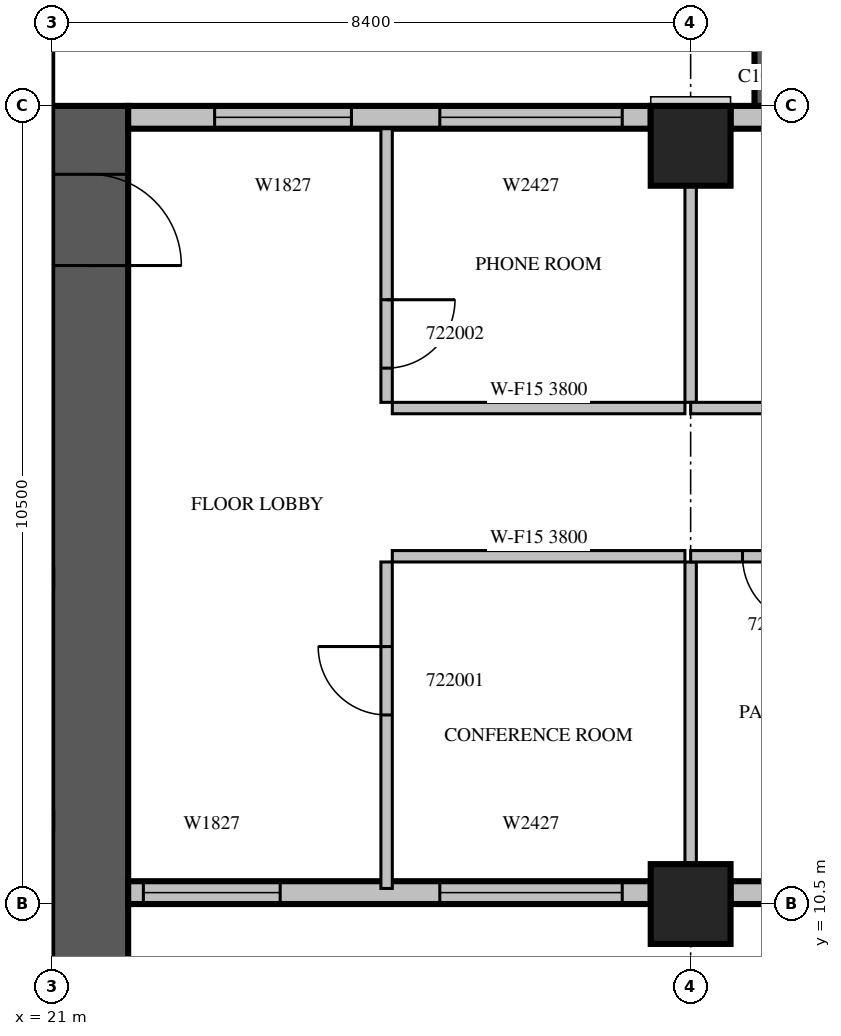
"""IFC4 building model, lengths in metres.
Left out: names, types, materials, properties, quantities, classifications, styles, units other than length and angle.
Written with IfcOpenShell. Run it as: python <this file> out.ifc"""

import sys

from ifc_helpers import new_model, si_unit, direction, frame, frame_2d, origin, origin_2d, place, context, subcontext, project, spatial, rectangle, extrude, source, transform, mapped, element, fill, save


model = new_model("IFC4")
c1 = context("Model", 3, precision=1e-05, world=origin(), true_north=direction((0.0, 1.0)))
c2 = subcontext(c1, "Body", "Model", "MODEL_VIEW")
j1 = project(units=[si_unit("LENGTHUNIT", "METRE"), si_unit("PLANEANGLEUNIT", "RADIAN")], contexts=[c1])
p1 = place(None, origin())
s1 = spatial("IfcSite", under=j1, at=p1, CompositionType="ELEMENT")
p2 = place(p1, origin())
s2 = spatial("IfcBuilding", under=s1, at=p2, CompositionType="ELEMENT")
p3 = place(p2, frame((0.0, 0.0, 103.5)))
s3 = spatial("IfcBuildingStorey", under=s2, at=p3, CompositionType="ELEMENT", Elevation=103.5)
m1 = source(origin(), c2, "Body", "SweptSolid", [
    extrude(rectangle(XDim=1.05, YDim=1.05, at=origin_2d()), origin(), (0.0, 0.0, 1.0), 4.2),
])
for number, where, z_axis, x_axis in (
    (1, (29.4, 10.5, 0.0), (0.0, 0.0, 1.0), (1.0, 0.0, 0.0)),
    (2, (29.4, 20.475, 0.0), (0.0, 0.0, 1.0), (1.0, 0.0, 0.0)),
):
    element("IfcColumn", number, at=place(p3, frame(where, z_axis=z_axis, x_axis=x_axis)), inside=s3, PredefinedType="COLUMN", context=c2, shape_type="MappedRepresentation", body=[
        mapped(m1, transform((0.0, 0.0, 0.0), scale=1.0)),
    ])
p4 = place(p3, frame((21.5, 4.2, 0.0), z_axis=(0.0, 0.0, 1.0), x_axis=(0.0, 1.0, 0.0)))
e3 = element("IfcWall", 3, at=p4, inside=s3, PredefinedType="SHEAR", context=c2, shape_type="SweptSolid", body=[
    extrude(rectangle(XDim=16.8, YDim=1.0, at=frame_2d((8.4, 0.0))), origin(), (0.0, 0.0, 1.0), 4.2),
])
m2 = source(origin(), c2, "Body", "SweptSolid", [
    extrude(rectangle(XDim=1.2, YDim=2.1, at=frame_2d((0.6, 1.05))), frame((0.0, 0.51, 0.0), z_axis=(0.0, -1.0, 0.0), x_axis=(1.0, 0.0, 0.0)), (0.0, 0.0, 1.0), 1.02),
])
p5 = place(p4, frame((14.7, 0.0, 0.0)))
e4 = element("IfcOpeningElement", 4, at=p5, cuts=e3, PredefinedType="OPENING", context=c2, shape_type="MappedRepresentation", body=[
    mapped(m2, transform((0.0, 0.0, 0.0), scale=1.0)),
])
p6 = place(p3, frame((22.0, 10.65, 0.0), z_axis=(0.0, 0.0, 1.0), x_axis=(1.0, 0.0, 0.0)))
e5 = element("IfcWall", 5, at=p6, inside=s3, PredefinedType="STANDARD", context=c2, shape_type="SweptSolid", body=[
    extrude(rectangle(XDim=6.875, YDim=0.3, at=frame_2d((3.438, 0.0))), origin(), (0.0, 0.0, 1.0), 3.8),
])
m3 = source(origin(), c2, "Body", "SweptSolid", [
    extrude(rectangle(XDim=1.8, YDim=2.7, at=frame_2d((0.9, 1.35))), frame((0.0, 0.16, 0.0), z_axis=(0.0, -1.0, 0.0), x_axis=(1.0, 0.0, 0.0)), (0.0, 0.0, 1.0), 0.32),
])
p7 = place(p6, frame((0.2, 0.0, 0.6)))
e6 = element("IfcOpeningElement", 6, at=p7, cuts=e5, PredefinedType="OPENING", context=c2, shape_type="MappedRepresentation", body=[
    mapped(m3, transform((0.0, 0.0, 0.0), scale=1.0)),
])
m4 = source(origin(), c2, "Body", "SweptSolid", [
    extrude(rectangle(XDim=2.4, YDim=2.7, at=frame_2d((1.2, 1.35))), frame((0.0, 0.16, 0.0), z_axis=(0.0, -1.0, 0.0), x_axis=(1.0, 0.0, 0.0)), (0.0, 0.0, 1.0), 0.32),
])
p8 = place(p6, frame((4.1, 0.0, 0.6)))
e7 = element("IfcOpeningElement", 7, at=p8, cuts=e5, PredefinedType="OPENING", context=c2, shape_type="MappedRepresentation", body=[
    mapped(m4, transform((0.0, 0.0, 0.0), scale=1.0)),
])
m5 = source(origin(), c2, "Body", "SweptSolid", [
    extrude(rectangle(XDim=7.35, YDim=0.3, at=frame_2d((3.675, 0.0))), origin(), (0.0, 0.0, 1.0), 3.8),
])
p9 = place(p3, frame((29.925, 10.65, 0.0), z_axis=(0.0, 0.0, 1.0), x_axis=(1.0, 0.0, 0.0)))
e8 = element("IfcWall", 8, at=p9, inside=s3, PredefinedType="STANDARD", context=c2, shape_type="MappedRepresentation", body=[
    mapped(m5, transform((0.0, 0.0, 0.0), scale=1.0)),
])
p10 = place(p9, frame((4.948, 0.0, 0.6)))
e9 = element("IfcOpeningElement", 9, at=p10, cuts=e8, PredefinedType="OPENING", context=c2, shape_type="MappedRepresentation", body=[
    mapped(m3, transform((0.0, 0.0, 0.0), scale=1.0)),
])
m6 = source(origin(), c2, "Body", "SweptSolid", [
    extrude(rectangle(XDim=1.2, YDim=2.7, at=frame_2d((0.6, 1.35))), frame((0.0, 0.16, 0.0), z_axis=(0.0, -1.0, 0.0), x_axis=(1.0, 0.0, 0.0)), (0.0, 0.0, 1.0), 0.32),
])
p11 = place(p9, frame((2.195, 0.0, 0.6)))
e10 = element("IfcOpeningElement", 10, at=p11, cuts=e8, PredefinedType="OPENING", context=c2, shape_type="MappedRepresentation", body=[
    mapped(m6, transform((0.0, 0.0, 0.0), scale=1.0)),
])
p12 = place(p3, frame((37.275, 20.85, 0.0), z_axis=(0.0, 0.0, 1.0), x_axis=(-1.0, 0.0, 0.0)))
e11 = element("IfcWall", 11, at=p12, inside=s3, PredefinedType="STANDARD", context=c2, shape_type="MappedRepresentation", body=[
    mapped(m5, transform((0.0, 0.0, 0.0), scale=1.0)),
])
m7 = source(origin(), c2, "Body", "SweptSolid", [
    extrude(rectangle(XDim=1.0, YDim=2.1, at=frame_2d((0.5, 1.05))), frame((0.0, 0.16, 0.0), z_axis=(0.0, -1.0, 0.0), x_axis=(1.0, 0.0, 0.0)), (0.0, 0.0, 1.0), 0.32),
])
p13 = place(p12, frame((5.135, 0.0, 0.0)))
e12 = element("IfcOpeningElement", 12, at=p13, cuts=e11, PredefinedType="OPENING", context=c2, shape_type="MappedRepresentation", body=[
    mapped(m7, transform((0.0, 0.0, 0.0), scale=1.0)),
])
m8 = source(origin(), c2, "Body", "SweptSolid", [
    extrude(rectangle(XDim=6.875, YDim=0.3, at=frame_2d((3.438, 0.0))), origin(), (0.0, 0.0, 1.0), 3.8),
])
p14 = place(p3, frame((28.875, 20.85, 0.0), z_axis=(0.0, 0.0, 1.0), x_axis=(-1.0, 0.0, 0.0)))
e13 = element("IfcWall", 13, at=p14, inside=s3, PredefinedType="STANDARD", context=c2, shape_type="MappedRepresentation", body=[
    mapped(m8, transform((0.0, 0.0, 0.0), scale=1.0)),
])
p15 = place(p14, frame((0.375, 0.0, 0.6)))
e14 = element("IfcOpeningElement", 14, at=p15, cuts=e13, PredefinedType="OPENING", context=c2, shape_type="MappedRepresentation", body=[
    mapped(m4, transform((0.0, 0.0, 0.0), scale=1.0)),
])
p16 = place(p14, frame((3.938, 0.0, 0.6)))
e15 = element("IfcOpeningElement", 15, at=p16, cuts=e13, PredefinedType="OPENING", context=c2, shape_type="MappedRepresentation", body=[
    mapped(m3, transform((0.0, 0.0, 0.0), scale=1.0)),
])
m9 = source(origin(), c2, "Body", "SweptSolid", [
    extrude(rectangle(XDim=3.9, YDim=0.2, at=frame_2d((1.95, 0.0))), origin(), (0.0, 0.0, 1.0), 3.79),
])
p17 = place(p3, frame((30.34, 21.0, 0.0), z_axis=(0.0, 0.0, 1.0), x_axis=(0.0, 1.0, 0.0)))
e16 = element("IfcWall", 16, at=p17, inside=s3, PredefinedType="SOLIDWALL", context=c2, shape_type="MappedRepresentation", body=[
    mapped(m9, transform((0.0, 0.0, 0.0), scale=1.0)),
])
m10 = source(origin(), c2, "Body", "SweptSolid", [
    extrude(rectangle(XDim=2.4, YDim=2.7, at=frame_2d((1.2, 1.35))), frame((0.0, 0.11, 0.0), z_axis=(0.0, -1.0, 0.0), x_axis=(1.0, 0.0, 0.0)), (0.0, 0.0, 1.0), 0.22),
])
p18 = place(p17, frame((0.75, 0.0, 0.6)))
e17 = element("IfcOpeningElement", 17, at=p18, cuts=e16, PredefinedType="OPENING", context=c2, shape_type="MappedRepresentation", body=[
    mapped(m10, transform((0.0, 0.0, 0.0), scale=1.0)),
])
m11 = source(origin(), c2, "Body", "SweptSolid", [
    extrude(rectangle(XDim=4.295, YDim=0.15, at=frame_2d((2.147, 0.0))), origin(), (0.0, 0.0, 1.0), 3.8),
])
p19 = place(p3, frame((25.4, 15.0, 0.0), z_axis=(0.0, 0.0, 1.0), x_axis=(0.0, -1.0, 0.0)))
e18 = element("IfcWall", 18, at=p19, inside=s3, PredefinedType="PARTITIONING", context=c2, shape_type="MappedRepresentation", body=[
    mapped(m11, transform((0.0, 0.0, 0.0), scale=1.0)),
])
m12 = source(origin(), c2, "Body", "SweptSolid", [
    extrude(rectangle(XDim=0.9, YDim=2.1, at=frame_2d((0.45, 1.05))), frame((0.0, 0.085, 0.0), z_axis=(0.0, -1.0, 0.0), x_axis=(1.0, 0.0, 0.0)), (0.0, 0.0, 1.0), 0.17),
])
p20 = place(p19, frame((1.113, 0.0, 0.0)))
e19 = element("IfcOpeningElement", 19, at=p20, cuts=e18, PredefinedType="OPENING", context=c2, shape_type="MappedRepresentation", body=[
    mapped(m12, transform((0.0, 0.0, 0.0), scale=1.0)),
])
m13 = source(origin(), c2, "Body", "SweptSolid", [
    extrude(rectangle(XDim=3.6, YDim=0.15, at=frame_2d((1.8, 0.0))), origin(), (0.0, 0.0, 1.0), 3.8),
])
p21 = place(p3, frame((25.4, 20.7, 0.0), z_axis=(0.0, 0.0, 1.0), x_axis=(0.0, -1.0, 0.0)))
e20 = element("IfcWall", 20, at=p21, inside=s3, PredefinedType="PARTITIONING", context=c2, shape_type="MappedRepresentation", body=[
    mapped(m13, transform((0.0, 0.0, 0.0), scale=1.0)),
])
p22 = place(p21, frame((2.25, 0.0, 0.0)))
e21 = element("IfcOpeningElement", 21, at=p22, cuts=e20, PredefinedType="OPENING", context=c2, shape_type="MappedRepresentation", body=[
    mapped(m12, transform((0.0, 0.0, 0.0), scale=1.0)),
])
p23 = place(p3, frame((29.325, 15.075, 0.0), z_axis=(0.0, 0.0, 1.0), x_axis=(-1.0, 0.0, 0.0)))
e22 = element("IfcWall", 22, at=p23, inside=s3, PredefinedType="PARTITIONING", context=c2, shape_type="SweptSolid", body=[
    extrude(rectangle(XDim=3.85, YDim=0.15, at=frame_2d((1.925, 0.0))), origin(), (0.0, 0.0, 1.0), 3.8),
])
m14 = source(origin(), c2, "Body", "SweptSolid", [
    extrude(rectangle(XDim=3.85, YDim=0.15, at=frame_2d((1.925, 0.0))), origin(), (0.0, 0.0, 1.0), 3.8),
])
p24 = place(p3, frame((25.475, 17.025, 0.0), z_axis=(0.0, 0.0, 1.0), x_axis=(1.0, 0.0, 0.0)))
e23 = element("IfcWall", 23, at=p24, inside=s3, PredefinedType="PARTITIONING", context=c2, shape_type="MappedRepresentation", body=[
    mapped(m14, transform((0.0, 0.0, 0.0), scale=1.0)),
])
p25 = place(p3, frame((29.4, 11.024, 0.0), z_axis=(0.0, 0.0, 1.0), x_axis=(0.0, 1.0, 0.0)))
e24 = element("IfcWall", 24, at=p25, inside=s3, PredefinedType="PARTITIONING", context=c2, shape_type="SweptSolid", body=[
    extrude(rectangle(XDim=3.976, YDim=0.15, at=frame_2d((1.988, 0.0))), origin(), (0.0, 0.0, 1.0), 3.8),
])
p26 = place(p3, frame((29.4, 17.1, 0.0), z_axis=(0.0, 0.0, 1.0), x_axis=(0.0, 1.0, 0.0)))
e25 = element("IfcWall", 25, at=p26, inside=s3, PredefinedType="PARTITIONING", context=c2, shape_type="SweptSolid", body=[
    extrude(rectangle(XDim=2.851, YDim=0.15, at=frame_2d((1.425, 0.0))), origin(), (0.0, 0.0, 1.0), 3.8),
])
m15 = source(origin(), c2, "Body", "SweptSolid", [
    extrude(rectangle(XDim=8.4, YDim=0.15, at=frame_2d((4.2, 0.0))), origin(), (0.0, 0.0, 1.0), 3.8),
])
p27 = place(p3, frame((37.8, 15.075, 0.0), z_axis=(0.0, 0.0, 1.0), x_axis=(-1.0, 0.0, 0.0)))
e26 = element("IfcWall", 26, at=p27, inside=s3, PredefinedType="PARTITIONING", context=c2, shape_type="MappedRepresentation", body=[
    mapped(m15, transform((0.0, 0.0, 0.0), scale=1.0)),
])
m16 = source(origin(), c2, "Body", "SweptSolid", [
    extrude(rectangle(XDim=1.1, YDim=2.1, at=frame_2d((0.55, 1.05))), frame((0.0, 0.085, 0.0), z_axis=(0.0, -1.0, 0.0), x_axis=(1.0, 0.0, 0.0)), (0.0, 0.0, 1.0), 0.17),
])
p28 = place(p27, frame((1.115, 0.0, 0.0)))
e27 = element("IfcOpeningElement", 27, at=p28, cuts=e26, PredefinedType="OPENING", context=c2, shape_type="MappedRepresentation", body=[
    mapped(m16, transform((0.0, 0.0, 0.0), scale=1.0)),
])
p29 = place(p27, frame((6.818, 0.0, 0.0)))
e28 = element("IfcOpeningElement", 28, at=p29, cuts=e26, PredefinedType="OPENING", context=c2, shape_type="MappedRepresentation", body=[
    mapped(m12, transform((0.0, 0.0, 0.0), scale=1.0)),
])
p30 = place(p27, frame((4.282, 0.0, 0.0)))
e29 = element("IfcOpeningElement", 29, at=p30, cuts=e26, PredefinedType="OPENING", context=c2, shape_type="MappedRepresentation", body=[
    mapped(m12, transform((0.0, 0.0, 0.0), scale=1.0)),
])
m17 = source(origin(), c2, "Body", "SweptSolid", [
    extrude(rectangle(XDim=37.5, YDim=0.15, at=frame_2d((18.75, 0.0))), origin(), (0.0, 0.0, 1.0), 3.8),
])
p31 = place(p3, frame((29.4, 17.025, 0.0), z_axis=(0.0, 0.0, 1.0), x_axis=(1.0, 0.0, 0.0)))
e30 = element("IfcWall", 30, at=p31, inside=s3, PredefinedType="PARTITIONING", context=c2, shape_type="MappedRepresentation", body=[
    mapped(m17, transform((0.0, 0.0, 0.0), scale=1.0)),
])
m18 = source(origin(), c2, "Body", "SweptSolid", [
    extrude(rectangle(XDim=1.0, YDim=2.1, at=frame_2d((0.5, 1.05))), frame((0.0, 0.085, 0.0), z_axis=(0.0, -1.0, 0.0), x_axis=(1.0, 0.0, 0.0)), (0.0, 0.0, 1.0), 0.17),
])
p32 = place(p31, frame((1.357, 0.0, 0.0)))
e31 = element("IfcOpeningElement", 31, at=p32, cuts=e30, PredefinedType="OPENING", context=c2, shape_type="MappedRepresentation", body=[
    mapped(m18, transform((0.0, 0.0, 0.0), scale=1.0)),
])
p33 = place(p31, frame((4.669, 0.0, 0.0)))
e32 = element("IfcOpeningElement", 32, at=p33, cuts=e30, PredefinedType="OPENING", context=c2, shape_type="MappedRepresentation", body=[
    mapped(m18, transform((0.0, 0.0, 0.0), scale=1.0)),
])
p34 = place(p31, frame((7.012, 0.0, 0.0)))
e33 = element("IfcOpeningElement", 33, at=p34, cuts=e30, PredefinedType="OPENING", context=c2, shape_type="MappedRepresentation", body=[
    mapped(m18, transform((0.0, 0.0, 0.0), scale=1.0)),
])
p35 = place(p31, frame((10.342, 0.0, 0.0)))
e34 = element("IfcOpeningElement", 34, at=p35, cuts=e30, PredefinedType="OPENING", context=c2, shape_type="MappedRepresentation", body=[
    mapped(m12, transform((0.0, 0.0, 0.0), scale=1.0)),
])
p36 = place(p31, frame((15.09, 0.0, 0.0)))
e35 = element("IfcOpeningElement", 35, at=p36, cuts=e30, PredefinedType="OPENING", context=c2, shape_type="MappedRepresentation", body=[
    mapped(m12, transform((0.0, 0.0, 0.0), scale=1.0)),
])
p37 = place(p31, frame((19.837, 0.0, 0.0)))
e36 = element("IfcOpeningElement", 36, at=p37, cuts=e30, PredefinedType="OPENING", context=c2, shape_type="MappedRepresentation", body=[
    mapped(m12, transform((0.0, 0.0, 0.0), scale=1.0)),
])
m19 = source(origin(), c2, "Body", "SweptSolid", [
    extrude(rectangle(XDim=1.2, YDim=2.1, at=frame_2d((0.6, 1.05))), frame((0.0, 0.085, 0.0), z_axis=(0.0, -1.0, 0.0), x_axis=(1.0, 0.0, 0.0)), (0.0, 0.0, 1.0), 0.17),
])
p38 = place(p31, frame((25.804, 0.0, 0.0)))
e37 = element("IfcOpeningElement", 37, at=p38, cuts=e30, PredefinedType="OPENING", context=c2, shape_type="MappedRepresentation", body=[
    mapped(m19, transform((0.0, 0.0, 0.0), scale=1.0)),
])
p39 = place(p31, frame((33.251, 0.0, 0.0)))
e38 = element("IfcOpeningElement", 38, at=p39, cuts=e30, PredefinedType="OPENING", context=c2, shape_type="MappedRepresentation", body=[
    mapped(m19, transform((0.0, 0.0, 0.0), scale=1.0)),
])
m20 = source(origin(), c2, "Body", "SweptSolid", [
    extrude(rectangle(XDim=1.8, YDim=2.7, at=frame_2d((0.9, 1.35))), frame((0.0, 0.03, 0.0), z_axis=(0.0, -1.0, 0.0), x_axis=(1.0, 0.0, 0.0)), (0.0, 0.0, 1.0), 0.06),
])
p40 = place(p7, origin())
e39 = element("IfcWindow", 39, at=p40, inside=s3, PartitioningType="SINGLE_PANEL", PredefinedType="WINDOW", context=c2, shape_type="MappedRepresentation", body=[
    mapped(m20, transform((0.0, 0.0, 0.0), scale=1.0)),
])
fill(e6, e39)
m21 = source(origin(), c2, "Body", "SweptSolid", [
    extrude(rectangle(XDim=2.4, YDim=2.7, at=frame_2d((1.2, 1.35))), frame((0.0, 0.03, 0.0), z_axis=(0.0, -1.0, 0.0), x_axis=(1.0, 0.0, 0.0)), (0.0, 0.0, 1.0), 0.06),
])
p41 = place(p8, origin())
e40 = element("IfcWindow", 40, at=p41, inside=s3, PartitioningType="SINGLE_PANEL", PredefinedType="WINDOW", context=c2, shape_type="MappedRepresentation", body=[
    mapped(m21, transform((0.0, 0.0, 0.0), scale=1.0)),
])
fill(e7, e40)
p42 = place(p15, origin())
e41 = element("IfcWindow", 41, at=p42, inside=s3, PartitioningType="SINGLE_PANEL", PredefinedType="WINDOW", context=c2, shape_type="MappedRepresentation", body=[
    mapped(m21, transform((0.0, 0.0, 0.0), scale=1.0)),
])
fill(e14, e41)
p43 = place(p16, origin())
e42 = element("IfcWindow", 42, at=p43, inside=s3, PartitioningType="SINGLE_PANEL", PredefinedType="WINDOW", context=c2, shape_type="MappedRepresentation", body=[
    mapped(m20, transform((0.0, 0.0, 0.0), scale=1.0)),
])
fill(e15, e42)
m22 = source(origin(), c2, "Body", "SweptSolid", [
    extrude(rectangle(XDim=1.2, YDim=2.1, at=frame_2d((0.6, 1.05))), frame((0.0, 0.025, 0.0), z_axis=(0.0, -1.0, 0.0), x_axis=(1.0, 0.0, 0.0)), (0.0, 0.0, 1.0), 0.05),
])
p44 = place(p5, origin())
e43 = element("IfcDoor", 43, at=p44, inside=s3, OperationType="SINGLE_SWING_RIGHT", PredefinedType="DOOR", context=c2, shape_type="MappedRepresentation", body=[
    mapped(m22, transform((0.0, 0.0, 0.0), scale=1.0)),
])
fill(e4, e43)
m23 = source(origin(), c2, "Body", "SweptSolid", [
    extrude(rectangle(XDim=0.9, YDim=2.1, at=frame_2d((0.45, 1.05))), frame((0.0, 0.025, 0.0), z_axis=(0.0, -1.0, 0.0), x_axis=(1.0, 0.0, 0.0)), (0.0, 0.0, 1.0), 0.05),
])
p45 = place(p20, origin())
e44 = element("IfcDoor", 44, at=p45, inside=s3, OperationType="SINGLE_SWING_RIGHT", PredefinedType="DOOR", context=c2, shape_type="MappedRepresentation", body=[
    mapped(m23, transform((0.0, 0.0, 0.0), scale=1.0)),
])
fill(e19, e44)
p46 = place(p22, origin())
e45 = element("IfcDoor", 45, at=p46, inside=s3, OperationType="SINGLE_SWING_LEFT", PredefinedType="DOOR", context=c2, shape_type="MappedRepresentation", body=[
    mapped(m23, transform((0.0, 0.0, 0.0), scale=1.0)),
])
fill(e21, e45)
p47 = place(p29, origin())
e46 = element("IfcDoor", 46, at=p47, inside=s3, OperationType="SINGLE_SWING_LEFT", PredefinedType="DOOR", context=c2, shape_type="MappedRepresentation", body=[
    mapped(m23, transform((0.0, 0.0, 0.0), scale=1.0)),
])
fill(e28, e46)
save(model, sys.argv[1])
